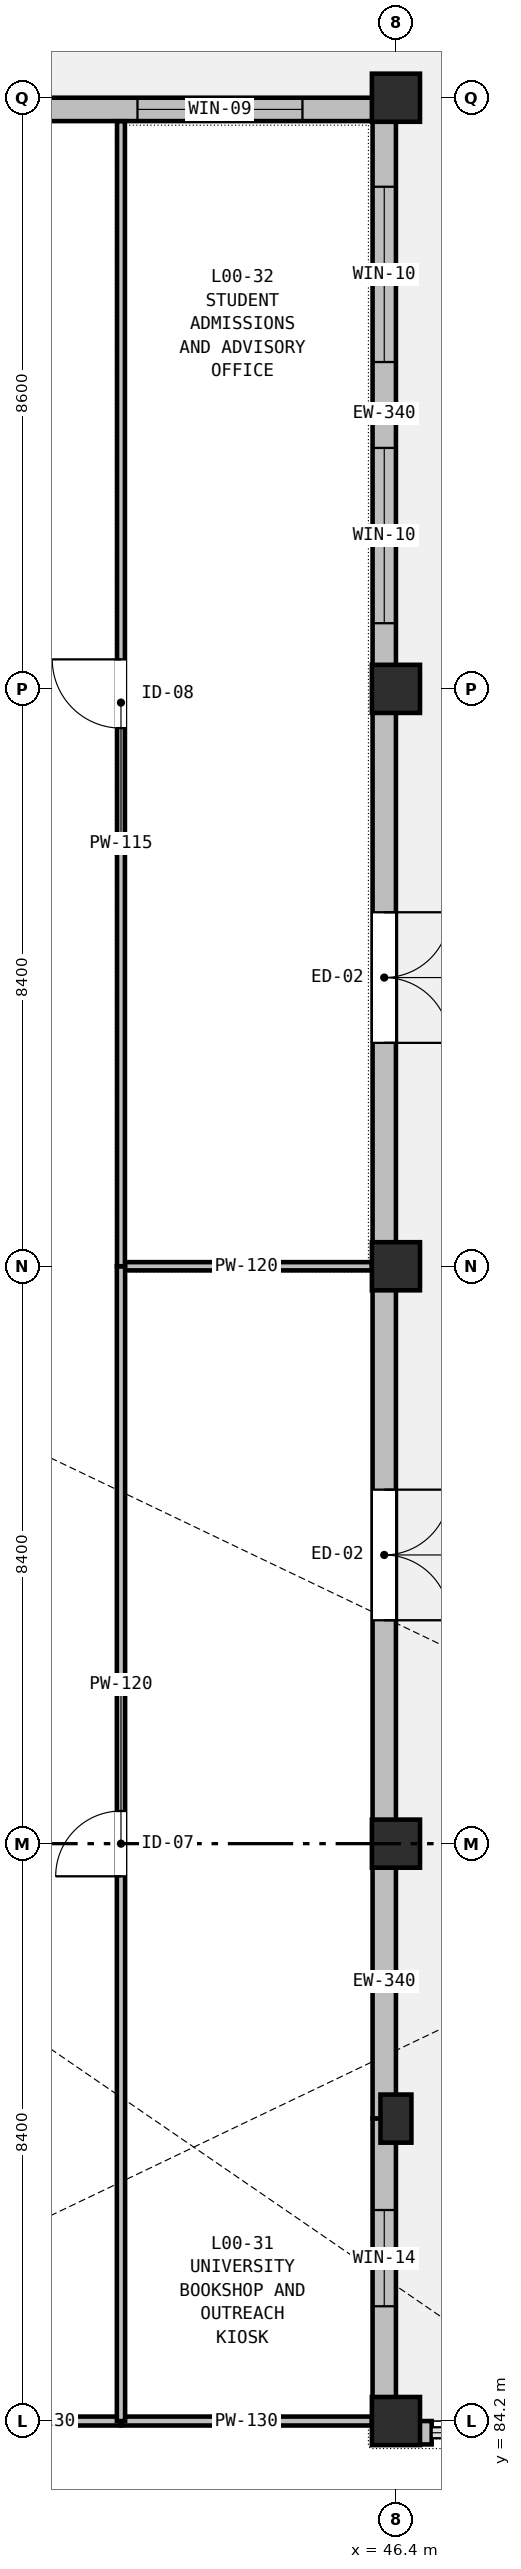
"""IFC4 building model, lengths in metres.
Left out: names, types, materials, properties, quantities, classifications, styles, units other than length and angle.
Written with IfcOpenShell. Run it as: python <this file> out.ifc"""

import sys

from ifc_helpers import new_model, si_unit, direction, frame, frame_2d, origin, origin_2d, place, context, subcontext, project, spatial, rectangle, extrude, element, fill, save


model = new_model("IFC4")
c1 = context("Model", 3, precision=1e-05, world=origin(), true_north=direction((0.0, 1.0)))
c2 = subcontext(c1, "Body", "Model", "MODEL_VIEW")
j1 = project(units=[si_unit("LENGTHUNIT", "METRE"), si_unit("PLANEANGLEUNIT", "RADIAN")], contexts=[c1])
p1 = place(None, origin())
s1 = spatial("IfcSite", under=j1, at=p1, CompositionType="ELEMENT")
p2 = place(p1, origin())
s2 = spatial("IfcBuilding", under=s1, at=p2, CompositionType="ELEMENT")
p3 = place(p2, origin())
s3 = spatial("IfcBuildingStorey", under=s2, at=p3, CompositionType="ELEMENT", Elevation=0.0)
p4 = place(p3, frame((46.4, 84.2, -0.32), z_axis=(0.0, 0.0, 1.0), x_axis=(1.0, 0.0, 0.0)))
e1 = element("IfcColumn", 1, at=p4, inside=s3, PredefinedType="COLUMN", context=c2, shape_type="SweptSolid", body=[
    extrude(rectangle(XDim=0.7, YDim=0.7, at=origin_2d()), origin(), (0.0, 0.0, 1.0), 5.72),
])
for number, where, z_axis, x_axis in (
    (2, (46.4, 92.6, -0.32), (0.0, 0.0, 1.0), (1.0, 0.0, 0.0)),
    (3, (46.4, 101.0, -0.32), (0.0, 0.0, 1.0), (1.0, 0.0, 0.0)),
    (4, (46.4, 109.4, -0.32), (0.0, 0.0, 1.0), (1.0, 0.0, 0.0)),
    (5, (46.4, 118.0, -0.32), (0.0, 0.0, 1.0), (1.0, 0.0, 0.0)),
):
    element("IfcColumn", number, at=place(p3, frame(where, z_axis=z_axis, x_axis=x_axis)), inside=s3, PredefinedType="COLUMN", context=c2, shape_type="SweptSolid", body=[
        extrude(rectangle(XDim=0.7, YDim=0.7, at=origin_2d()), origin(), (0.0, 0.0, 1.0), 5.66),
    ])
p5 = place(p3, frame((46.4, 88.6, -0.32), z_axis=(0.0, 0.0, 1.0), x_axis=(1.0, 0.0, 0.0)))
e6 = element("IfcColumn", 6, at=p5, inside=s3, PredefinedType="PILASTER", context=c2, shape_type="SweptSolid", body=[
    extrude(rectangle(XDim=0.45, YDim=0.7, at=origin_2d()), origin(), (0.0, 0.0, 1.0), 5.66),
])
p6 = place(p3, frame((39.8, 117.83, 0.0), z_axis=(0.0, 0.0, 1.0), x_axis=(1.0, 0.0, 0.0)))
e7 = element("IfcWall", 7, at=p6, inside=s3, PredefinedType="STANDARD", context=c2, shape_type="SweptSolid", body=[
    extrude(rectangle(XDim=6.6, YDim=0.34, at=frame_2d((3.3, 0.0))), origin(), (0.0, 0.0, 1.0), 4.535),
])
p7 = place(p6, frame((2.84, 0.0, 0.9)))
e8 = element("IfcOpeningElement", 8, at=p7, cuts=e7, PredefinedType="OPENING", context=c2, shape_type="SweptSolid", body=[
    extrude(rectangle(XDim=2.4, YDim=2.1, at=frame_2d((1.2, 1.05))), frame((0.0, 0.18, 0.0), z_axis=(0.0, -1.0, 0.0), x_axis=(1.0, 0.0, 0.0)), (0.0, 0.0, 1.0), 0.36),
])
p8 = place(p3, frame((46.23, 117.66, 0.0), z_axis=(0.0, 0.0, 1.0), x_axis=(0.0, -1.0, 0.0)))
e9 = element("IfcWall", 9, at=p8, inside=s3, PredefinedType="STANDARD", context=c2, shape_type="SweptSolid", body=[
    extrude(rectangle(XDim=8.26, YDim=0.34, at=frame_2d((4.13, 0.0))), origin(), (0.0, 0.0, 1.0), 4.685),
])
p9 = place(p8, frame((0.955, 0.0, 0.75)))
e10 = element("IfcOpeningElement", 10, at=p9, cuts=e9, PredefinedType="OPENING", context=c2, shape_type="SweptSolid", body=[
    extrude(rectangle(XDim=2.55, YDim=2.15, at=frame_2d((1.275, 1.075))), frame((0.0, 0.18, 0.0), z_axis=(0.0, -1.0, 0.0), x_axis=(1.0, 0.0, 0.0)), (0.0, 0.0, 1.0), 0.36),
])
p10 = place(p8, frame((4.755, 0.0, 0.75)))
e11 = element("IfcOpeningElement", 11, at=p10, cuts=e9, PredefinedType="OPENING", context=c2, shape_type="SweptSolid", body=[
    extrude(rectangle(XDim=2.55, YDim=2.15, at=frame_2d((1.275, 1.075))), frame((0.0, 0.18, 0.0), z_axis=(0.0, -1.0, 0.0), x_axis=(1.0, 0.0, 0.0)), (0.0, 0.0, 1.0), 0.36),
])
p11 = place(p3, frame((46.23, 109.4, 0.0), z_axis=(0.0, 0.0, 1.0), x_axis=(0.0, -1.0, 0.0)))
e12 = element("IfcWall", 12, at=p11, inside=s3, PredefinedType="STANDARD", context=c2, shape_type="SweptSolid", body=[
    extrude(rectangle(XDim=8.4, YDim=0.34, at=frame_2d((4.2, 0.0))), origin(), (0.0, 0.0, 1.0), 4.685),
])
p12 = place(p11, frame((3.25, 0.0, 0.0)))
e13 = element("IfcOpeningElement", 13, at=p12, cuts=e12, PredefinedType="OPENING", context=c2, shape_type="SweptSolid", body=[
    extrude(rectangle(XDim=1.9, YDim=2.3, at=frame_2d((0.95, 1.15))), frame((0.0, 0.18, 0.0), z_axis=(0.0, -1.0, 0.0), x_axis=(1.0, 0.0, 0.0)), (0.0, 0.0, 1.0), 0.36),
])
p13 = place(p3, frame((46.23, 101.0, 0.0), z_axis=(0.0, 0.0, 1.0), x_axis=(0.0, -1.0, 0.0)))
e14 = element("IfcWall", 14, at=p13, inside=s3, PredefinedType="STANDARD", context=c2, shape_type="SweptSolid", body=[
    extrude(rectangle(XDim=8.4, YDim=0.34, at=frame_2d((4.2, 0.0))), origin(), (0.0, 0.0, 1.0), 4.685),
])
p14 = place(p13, frame((3.25, 0.0, 0.0)))
e15 = element("IfcOpeningElement", 15, at=p14, cuts=e14, PredefinedType="OPENING", context=c2, shape_type="SweptSolid", body=[
    extrude(rectangle(XDim=1.9, YDim=2.3, at=frame_2d((0.95, 1.15))), frame((0.0, 0.18, 0.0), z_axis=(0.0, -1.0, 0.0), x_axis=(1.0, 0.0, 0.0)), (0.0, 0.0, 1.0), 0.36),
])
p15 = place(p3, frame((46.23, 92.6, 0.0), z_axis=(0.0, 0.0, 1.0), x_axis=(0.0, -1.0, 0.0)))
e16 = element("IfcWall", 16, at=p15, inside=s3, PredefinedType="STANDARD", context=c2, shape_type="SweptSolid", body=[
    extrude(rectangle(XDim=4.0, YDim=0.34, at=frame_2d((2.0, 0.0))), origin(), (0.0, 0.0, 1.0), 4.685),
])
p16 = place(p3, frame((46.23, 88.6, 0.0), z_axis=(0.0, 0.0, 1.0), x_axis=(0.0, -1.0, 0.0)))
e17 = element("IfcWall", 17, at=p16, inside=s3, PredefinedType="STANDARD", context=c2, shape_type="SweptSolid", body=[
    extrude(rectangle(XDim=4.06, YDim=0.34, at=frame_2d((2.03, 0.0))), origin(), (0.0, 0.0, 1.0), 4.685),
])
p17 = place(p16, frame((1.33, 0.0, 0.9)))
e18 = element("IfcOpeningElement", 18, at=p17, cuts=e17, PredefinedType="OPENING", context=c2, shape_type="SweptSolid", body=[
    extrude(rectangle(XDim=1.4, YDim=1.55, at=frame_2d((0.7, 0.775))), frame((0.0, 0.18, 0.0), z_axis=(0.0, -1.0, 0.0), x_axis=(1.0, 0.0, 0.0)), (0.0, 0.0, 1.0), 0.36),
])
p18 = place(p3, frame((46.4, 84.03, 0.0), z_axis=(0.0, 0.0, 1.0), x_axis=(1.0, 0.0, 0.0)))
e19 = element("IfcWall", 19, at=p18, inside=s3, PredefinedType="STANDARD", context=c2, shape_type="SweptSolid", body=[
    extrude(rectangle(XDim=0.52, YDim=0.34, at=frame_2d((0.26, 0.0))), origin(), (0.0, 0.0, 1.0), 4.535),
])
p19 = place(p3, frame((40.15, 84.2, 0.0), z_axis=(0.0, 0.0, 1.0), x_axis=(1.0, 0.0, 0.0)))
e20 = element("IfcWall", 20, at=p19, inside=s3, PredefinedType="PARTITIONING", context=c2, shape_type="SweptSolid", body=[
    extrude(rectangle(XDim=2.25, YDim=0.13, at=frame_2d((1.125, 0.0))), origin(), (0.0, 0.0, 1.0), 4.735),
])
p20 = place(p3, frame((42.4, 84.2, 0.0), z_axis=(0.0, 0.0, 1.0), x_axis=(1.0, 0.0, 0.0)))
e21 = element("IfcWall", 21, at=p20, inside=s3, PredefinedType="PARTITIONING", context=c2, shape_type="SweptSolid", body=[
    extrude(rectangle(XDim=3.65, YDim=0.13, at=frame_2d((1.825, 0.0))), origin(), (0.0, 0.0, 1.0), 4.735),
])
p21 = place(p3, frame((42.4, 101.0, 0.0), z_axis=(0.0, 0.0, 1.0), x_axis=(1.0, 0.0, 0.0)))
e22 = element("IfcWall", 22, at=p21, inside=s3, PredefinedType="PARTITIONING", context=c2, shape_type="SweptSolid", body=[
    extrude(rectangle(XDim=3.65, YDim=0.12, at=frame_2d((1.825, 0.0))), origin(), (0.0, 0.0, 1.0), 4.735),
])
p22 = place(p3, frame((42.4, 84.2, 0.0), z_axis=(0.0, 0.0, 1.0), x_axis=(0.0, 1.0, 0.0)))
e23 = element("IfcWall", 23, at=p22, inside=s3, PredefinedType="PARTITIONING", context=c2, shape_type="SweptSolid", body=[
    extrude(rectangle(XDim=16.8, YDim=0.12, at=frame_2d((8.4, 0.0))), origin(), (0.0, 0.0, 1.0), 4.735),
])
p23 = place(p22, frame((7.925, 0.0, 0.0)))
e24 = element("IfcOpeningElement", 24, at=p23, cuts=e23, PredefinedType="OPENING", context=c2, shape_type="SweptSolid", body=[
    extrude(rectangle(XDim=0.95, YDim=2.06, at=frame_2d((0.475, 1.03))), frame((0.0, 0.07, 0.0), z_axis=(0.0, -1.0, 0.0), x_axis=(1.0, 0.0, 0.0)), (0.0, 0.0, 1.0), 0.14),
])
p24 = place(p3, frame((42.4, 101.0, 0.0), z_axis=(0.0, 0.0, 1.0), x_axis=(0.0, 1.0, 0.0)))
e25 = element("IfcWall", 25, at=p24, inside=s3, PredefinedType="PARTITIONING", context=c2, shape_type="SweptSolid", body=[
    extrude(rectangle(XDim=16.658, YDim=0.115, at=frame_2d((8.329, 0.0))), origin(), (0.0, 0.0, 1.0), 4.735),
])
p25 = place(p24, frame((7.829, 0.0, 0.0)))
e26 = element("IfcOpeningElement", 26, at=p25, cuts=e25, PredefinedType="OPENING", context=c2, shape_type="SweptSolid", body=[
    extrude(rectangle(XDim=1.0, YDim=2.06, at=frame_2d((0.5, 1.03))), frame((0.0, 0.067, 0.0), z_axis=(0.0, -1.0, 0.0), x_axis=(1.0, 0.0, 0.0)), (0.0, 0.0, 1.0), 0.135),
])
p26 = place(p14, origin())
e27 = element("IfcDoor", 27, at=p26, inside=s3, OperationType="DOUBLE_DOOR_SINGLE_SWING", PredefinedType="DOOR", context=c2, shape_type="SweptSolid", body=[
    extrude(rectangle(XDim=1.9, YDim=2.3, at=frame_2d((0.95, 1.15))), frame((0.0, 0.025, 0.0), z_axis=(0.0, -1.0, 0.0), x_axis=(1.0, 0.0, 0.0)), (0.0, 0.0, 1.0), 0.05),
])
fill(e15, e27)
p27 = place(p12, origin())
e28 = element("IfcDoor", 28, at=p27, inside=s3, OperationType="DOUBLE_DOOR_SINGLE_SWING", PredefinedType="DOOR", context=c2, shape_type="SweptSolid", body=[
    extrude(rectangle(XDim=1.9, YDim=2.3, at=frame_2d((0.95, 1.15))), frame((0.0, 0.025, 0.0), z_axis=(0.0, -1.0, 0.0), x_axis=(1.0, 0.0, 0.0)), (0.0, 0.0, 1.0), 0.05),
])
fill(e13, e28)
p28 = place(p7, origin())
e29 = element("IfcWindow", 29, at=p28, inside=s3, PartitioningType="SINGLE_PANEL", PredefinedType="WINDOW", context=c2, shape_type="SweptSolid", body=[
    extrude(rectangle(XDim=2.4, YDim=2.1, at=frame_2d((1.2, 1.05))), frame((0.0, 0.03, 0.0), z_axis=(0.0, -1.0, 0.0), x_axis=(1.0, 0.0, 0.0)), (0.0, 0.0, 1.0), 0.06),
])
fill(e8, e29)
p29 = place(p9, origin())
e30 = element("IfcWindow", 30, at=p29, inside=s3, PartitioningType="SINGLE_PANEL", PredefinedType="WINDOW", context=c2, shape_type="SweptSolid", body=[
    extrude(rectangle(XDim=2.55, YDim=2.15, at=frame_2d((1.275, 1.075))), frame((0.0, 0.03, 0.0), z_axis=(0.0, -1.0, 0.0), x_axis=(1.0, 0.0, 0.0)), (0.0, 0.0, 1.0), 0.06),
])
fill(e10, e30)
p30 = place(p10, origin())
e31 = element("IfcWindow", 31, at=p30, inside=s3, PartitioningType="SINGLE_PANEL", PredefinedType="WINDOW", context=c2, shape_type="SweptSolid", body=[
    extrude(rectangle(XDim=2.55, YDim=2.15, at=frame_2d((1.275, 1.075))), frame((0.0, 0.03, 0.0), z_axis=(0.0, -1.0, 0.0), x_axis=(1.0, 0.0, 0.0)), (0.0, 0.0, 1.0), 0.06),
])
fill(e11, e31)
p31 = place(p17, origin())
e32 = element("IfcWindow", 32, at=p31, inside=s3, PartitioningType="SINGLE_PANEL", PredefinedType="WINDOW", context=c2, shape_type="SweptSolid", body=[
    extrude(rectangle(XDim=1.4, YDim=1.55, at=frame_2d((0.7, 0.775))), frame((0.0, 0.03, 0.0), z_axis=(0.0, -1.0, 0.0), x_axis=(1.0, 0.0, 0.0)), (0.0, 0.0, 1.0), 0.06),
])
fill(e18, e32)
p32 = place(p23, origin())
e33 = element("IfcDoor", 33, at=p32, inside=s3, OperationType="SINGLE_SWING_LEFT", PredefinedType="DOOR", context=c2, shape_type="SweptSolid", body=[
    extrude(rectangle(XDim=0.95, YDim=2.06, at=frame_2d((0.475, 1.03))), frame((0.0, 0.025, 0.0), z_axis=(0.0, -1.0, 0.0), x_axis=(1.0, 0.0, 0.0)), (0.0, 0.0, 1.0), 0.05),
])
fill(e24, e33)
p33 = place(p25, origin())
e34 = element("IfcDoor", 34, at=p33, inside=s3, OperationType="SINGLE_SWING_RIGHT", PredefinedType="DOOR", context=c2, shape_type="SweptSolid", body=[
    extrude(rectangle(XDim=1.0, YDim=2.06, at=frame_2d((0.5, 1.03))), frame((0.0, 0.025, 0.0), z_axis=(0.0, -1.0, 0.0), x_axis=(1.0, 0.0, 0.0)), (0.0, 0.0, 1.0), 0.05),
])
fill(e26, e34)
save(model, sys.argv[1])
